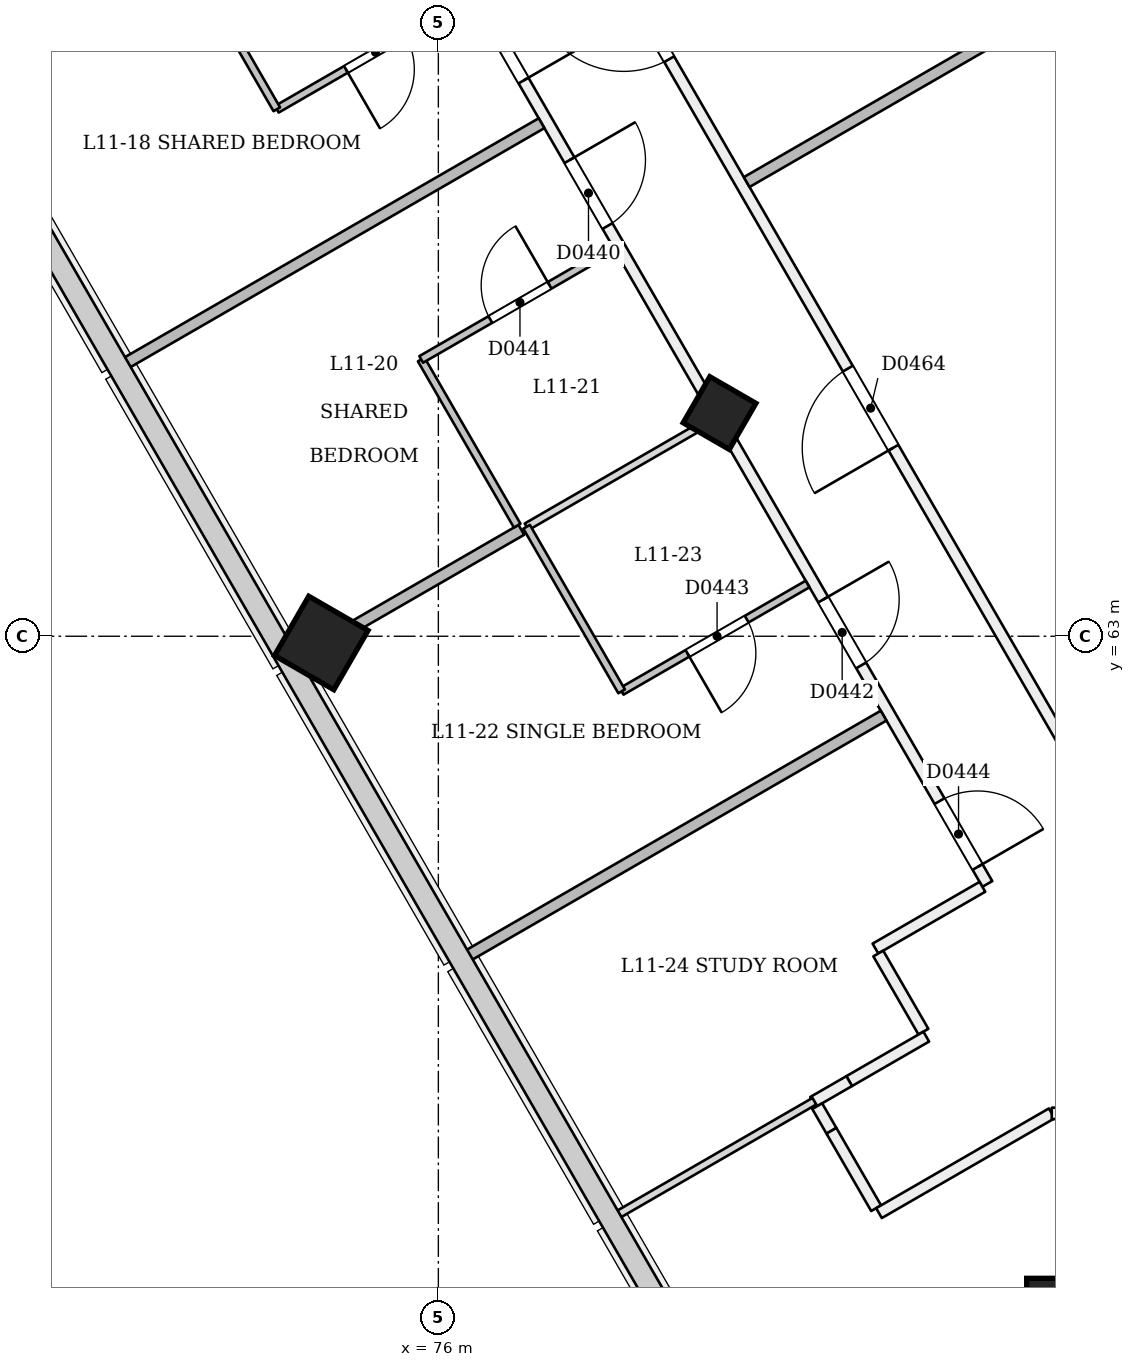
"""IFC4 building model, lengths in metres.
Left out: names, types, materials, properties, quantities, classifications, styles, units other than length and angle.
Written with IfcOpenShell. Run it as: python <this file> out.ifc"""

import sys

from ifc_helpers import new_model, si_unit, direction, frame, frame_2d, origin, origin_2d, place, context, subcontext, project, spatial, rectangle, extrude, element, fill, save


model = new_model("IFC4")
c1 = context("Model", 3, precision=1e-05, world=origin(), true_north=direction((0.0, 1.0)))
c2 = subcontext(c1, "Body", "Model", "MODEL_VIEW")
j1 = project(units=[si_unit("LENGTHUNIT", "METRE"), si_unit("PLANEANGLEUNIT", "RADIAN")], contexts=[c1])
p1 = place(None, origin())
s1 = spatial("IfcSite", under=j1, at=p1, CompositionType="ELEMENT")
p2 = place(p1, origin())
s2 = spatial("IfcBuilding", under=s1, at=p2, CompositionType="ELEMENT")
p3 = place(p2, frame((0.0, 0.0, 48.6)))
s3 = spatial("IfcBuildingStorey", under=s2, at=p3, CompositionType="ELEMENT", Elevation=48.6)
p4 = place(p3, frame((79.672, 65.889, -0.021), z_axis=(0.022222910879, 0.038415824599, 0.999014697916), x_axis=(-0.866022865462, -0.498524997193, 0.038434667567)))
e1 = element("IfcColumn", 1, at=p4, inside=s3, PredefinedType="COLUMN", context=c2, shape_type="SweptSolid", body=[
    extrude(rectangle(XDim=0.7, YDim=0.7, at=origin_2d()), origin(), (0.0, 0.0, 1.0), 3.604),
])
p5 = place(p3, frame((85.0, 53.223, 0.0), z_axis=(0.0, 0.058360852261, 0.998295552892), x_axis=(-1.0, 0.0, 0.0)))
e2 = element("IfcColumn", 2, at=p5, inside=s3, PredefinedType="COLUMN", context=c2, shape_type="SweptSolid", body=[
    extrude(rectangle(XDim=2.52, YDim=2.52, at=origin_2d()), origin(), (0.0, 0.0, 1.0), 3.606),
])
p6 = place(p3, frame((74.433, 62.864, -0.027), z_axis=(0.022155133694, 0.038483534979, 0.999013597298), x_axis=(-0.864981211028, -0.500328523642, 0.038456117832)))
e3 = element("IfcColumn", 3, at=p6, inside=s3, PredefinedType="COLUMN", context=c2, shape_type="SweptSolid", body=[
    extrude(rectangle(XDim=0.9, YDim=0.9, at=origin_2d()), origin(), (0.0, 0.0, 1.0), 3.604),
])
p7 = place(p3, frame((63.923, 93.17, 0.0), z_axis=(0.0, 0.0, 1.0), x_axis=(0.500002225217, -0.866024119051, 0.0)))
e4 = element("IfcWall", 4, at=p7, inside=s3, PredefinedType="PARTITIONING", context=c2, shape_type="SweptSolid", body=[
    extrude(rectangle(XDim=38.6, YDim=0.15, at=frame_2d((19.3, 0.0))), origin(), (0.0, 0.0, 1.0), 2.7),
])
p8 = place(p7, frame((0.605, 0.0, 0.0)))
e5 = element("IfcOpeningElement", 5, at=p8, cuts=e4, PredefinedType="OPENING", context=c2, shape_type="SweptSolid", body=[
    extrude(rectangle(XDim=1.0, YDim=2.1, at=frame_2d((0.5, 1.05))), frame((0.0, 0.085, 0.0), z_axis=(0.0, -1.0, 0.0), x_axis=(1.0, 0.0, 0.0)), (0.0, 0.0, 1.0), 0.171),
])
p9 = place(p7, frame((7.28, 0.0, 0.0)))
e6 = element("IfcOpeningElement", 6, at=p9, cuts=e4, PredefinedType="OPENING", context=c2, shape_type="SweptSolid", body=[
    extrude(rectangle(XDim=1.0, YDim=2.1, at=frame_2d((0.5, 1.05))), frame((0.0, 0.085, 0.0), z_axis=(0.0, -1.0, 0.0), x_axis=(1.0, 0.0, 0.0)), (0.0, 0.0, 1.0), 0.171),
])
p10 = place(p7, frame((9.72, 0.0, 0.0)))
e7 = element("IfcOpeningElement", 7, at=p10, cuts=e4, PredefinedType="OPENING", context=c2, shape_type="SweptSolid", body=[
    extrude(rectangle(XDim=1.0, YDim=2.1, at=frame_2d((0.5, 1.05))), frame((0.0, 0.085, 0.0), z_axis=(0.0, -1.0, 0.0), x_axis=(1.0, 0.0, 0.0)), (0.0, 0.0, 1.0), 0.171),
])
p11 = place(p7, frame((16.395, 0.0, 0.0)))
e8 = element("IfcOpeningElement", 8, at=p11, cuts=e4, PredefinedType="OPENING", context=c2, shape_type="SweptSolid", body=[
    extrude(rectangle(XDim=1.0, YDim=2.1, at=frame_2d((0.5, 1.05))), frame((0.0, 0.085, 0.0), z_axis=(0.0, -1.0, 0.0), x_axis=(1.0, 0.0, 0.0)), (0.0, 0.0, 1.0), 0.171),
])
p12 = place(p7, frame((18.72, 0.0, 0.0)))
e9 = element("IfcOpeningElement", 9, at=p12, cuts=e4, PredefinedType="OPENING", context=c2, shape_type="SweptSolid", body=[
    extrude(rectangle(XDim=1.0, YDim=2.1, at=frame_2d((0.5, 1.05))), frame((0.0, 0.085, 0.0), z_axis=(0.0, -1.0, 0.0), x_axis=(1.0, 0.0, 0.0)), (0.0, 0.0, 1.0), 0.171),
])
p13 = place(p7, frame((25.395, 0.0, 0.0)))
e10 = element("IfcOpeningElement", 10, at=p13, cuts=e4, PredefinedType="OPENING", context=c2, shape_type="SweptSolid", body=[
    extrude(rectangle(XDim=1.0, YDim=2.1, at=frame_2d((0.5, 1.05))), frame((0.0, 0.085, 0.0), z_axis=(0.0, -1.0, 0.0), x_axis=(1.0, 0.0, 0.0)), (0.0, 0.0, 1.0), 0.171),
])
p14 = place(p7, frame((27.605, 0.0, 0.0)))
e11 = element("IfcOpeningElement", 11, at=p14, cuts=e4, PredefinedType="OPENING", context=c2, shape_type="SweptSolid", body=[
    extrude(rectangle(XDim=1.0, YDim=2.1, at=frame_2d((0.5, 1.05))), frame((0.0, 0.085, 0.0), z_axis=(0.0, -1.0, 0.0), x_axis=(1.0, 0.0, 0.0)), (0.0, 0.0, 1.0), 0.171),
])
p15 = place(p7, frame((34.28, 0.0, 0.0)))
e12 = element("IfcOpeningElement", 12, at=p15, cuts=e4, PredefinedType="OPENING", context=c2, shape_type="SweptSolid", body=[
    extrude(rectangle(XDim=1.0, YDim=2.1, at=frame_2d((0.5, 1.05))), frame((0.0, 0.085, 0.0), z_axis=(0.0, -1.0, 0.0), x_axis=(1.0, 0.0, 0.0)), (0.0, 0.0, 1.0), 0.171),
])
p16 = place(p7, frame((37.342, 0.0, 0.0)))
e13 = element("IfcOpeningElement", 13, at=p16, cuts=e4, PredefinedType="OPENING", context=c2, shape_type="SweptSolid", body=[
    extrude(rectangle(XDim=1.0, YDim=2.1, at=frame_2d((0.5, 1.05))), frame((0.0, 0.085, 0.0), z_axis=(0.0, -1.0, 0.0), x_axis=(1.0, 0.0, 0.0)), (0.0, 0.0, 1.0), 0.171),
])
p17 = place(p3, frame((83.158, 59.704, 0.0), z_axis=(0.0, 0.0, 1.0), x_axis=(-0.866053003207, -0.499952193351, 0.0)))
e14 = element("IfcWall", 14, at=p17, inside=s3, PredefinedType="PARTITIONING", context=c2, shape_type="SweptSolid", body=[
    extrude(rectangle(XDim=1.625, YDim=0.15, at=frame_2d((0.812, 0.0))), origin(), (0.0, 0.0, 1.0), 3.1),
])
p18 = place(p3, frame((81.788, 58.826, 0.0), z_axis=(0.0, 0.0, 1.0), x_axis=(0.500030943131, -0.866007538022, 0.0)))
e15 = element("IfcWall", 15, at=p18, inside=s3, PredefinedType="PARTITIONING", context=c2, shape_type="SweptSolid", body=[
    extrude(rectangle(XDim=1.188, YDim=0.15, at=frame_2d((0.594, 0.0))), origin(), (0.0, 0.0, 1.0), 3.1),
])
p19 = place(p3, frame((82.419, 57.733, 0.0), z_axis=(0.0, 0.0, 1.0), x_axis=(-0.866053660865, -0.499951054106, 0.0)))
e16 = element("IfcWall", 16, at=p19, inside=s3, PredefinedType="PARTITIONING", context=c2, shape_type="SweptSolid", body=[
    extrude(rectangle(XDim=1.171, YDim=0.15, at=frame_2d((0.585, 0.0))), origin(), (0.0, 0.0, 1.0), 3.1),
])
p20 = place(p3, frame((81.405, 57.147, 0.0), z_axis=(0.0, 0.0, 1.0), x_axis=(-0.865963477364, -0.500107244371, 0.0)))
e17 = element("IfcWall", 17, at=p20, inside=s3, PredefinedType="PARTITIONING", context=c2, shape_type="SweptSolid", body=[
    extrude(rectangle(XDim=0.549, YDim=0.15, at=frame_2d((0.275, 0.0))), origin(), (0.0, 0.0, 1.0), 2.6),
])
p21 = place(p3, frame((80.984, 56.818, 0.0), z_axis=(0.0, 0.0, 1.0), x_axis=(0.500212318761, -0.865902786784, 0.0)))
e18 = element("IfcWall", 18, at=p21, inside=s3, PredefinedType="PARTITIONING", context=c2, shape_type="SweptSolid", body=[
    extrude(rectangle(XDim=0.374, YDim=0.15, at=frame_2d((0.187, 0.0))), origin(), (0.0, 0.0, 1.0), 2.6),
])
p22 = place(p3, frame((81.171, 56.494, 0.0), z_axis=(0.0, 0.0, 1.0), x_axis=(0.499890179513, -0.866088799389, 0.0)))
e19 = element("IfcWall", 19, at=p22, inside=s3, PredefinedType="PARTITIONING", context=c2, shape_type="SweptSolid", body=[
    extrude(rectangle(XDim=1.176, YDim=0.15, at=frame_2d((0.588, 0.0))), origin(), (0.0, 0.0, 1.0), 3.1),
])
p23 = place(p3, frame((81.797, 55.411, 0.0), z_axis=(0.0, 0.0, 1.0), x_axis=(0.866030680601, 0.499990860175, 0.0)))
e20 = element("IfcWall", 20, at=p23, inside=s3, PredefinedType="PARTITIONING", context=c2, shape_type="SweptSolid", body=[
    extrude(rectangle(XDim=2.625, YDim=0.15, at=frame_2d((1.312, 0.0))), origin(), (0.0, 0.0, 1.0), 2.6),
])
p24 = place(p3, frame((84.07, 56.723, 0.0), z_axis=(0.0, 0.0, 1.0), x_axis=(1.0, 0.0, 0.0)))
e21 = element("IfcWall", 21, at=p24, inside=s3, PredefinedType="PARTITIONING", context=c2, shape_type="SweptSolid", body=[
    extrude(rectangle(XDim=2.928, YDim=0.15, at=frame_2d((1.464, 0.0))), origin(), (0.0, 0.0, 1.0), 3.1),
])
p25 = place(p24, frame((0.493, 0.0, 0.0)))
e22 = element("IfcOpeningElement", 22, at=p25, cuts=e21, PredefinedType="OPENING", context=c2, shape_type="SweptSolid", body=[
    extrude(rectangle(XDim=1.2, YDim=2.1, at=frame_2d((0.6, 1.05))), frame((0.0, 0.085, 0.0), z_axis=(0.0, -1.0, 0.0), x_axis=(1.0, 0.0, 0.0)), (0.0, 0.0, 1.0), 0.171),
])
p26 = place(p3, frame((85.0, 60.262, 0.0), z_axis=(0.0, 0.0, 1.0), x_axis=(-0.499998554739, 0.866026238205, 0.0)))
e23 = element("IfcWall", 23, at=p26, inside=s3, PredefinedType="PARTITIONING", context=c2, shape_type="SweptSolid", body=[
    extrude(rectangle(XDim=35.031, YDim=0.15, at=frame_2d((17.515, 0.0))), origin(), (0.0, 0.0, 1.0), 3.1),
])
p27 = place(p26, frame((6.026, 0.0, 0.0)))
e24 = element("IfcOpeningElement", 24, at=p27, cuts=e23, PredefinedType="OPENING", context=c2, shape_type="SweptSolid", body=[
    extrude(rectangle(XDim=1.2, YDim=2.1, at=frame_2d((0.6, 1.05))), frame((0.0, 0.085, 0.0), z_axis=(0.0, -1.0, 0.0), x_axis=(1.0, 0.0, 0.0)), (0.0, 0.0, 1.0), 0.171),
])
p28 = place(p26, frame((19.295, 0.0, 0.0)))
e25 = element("IfcOpeningElement", 25, at=p28, cuts=e23, PredefinedType="OPENING", context=c2, shape_type="SweptSolid", body=[
    extrude(rectangle(XDim=1.2, YDim=2.1, at=frame_2d((0.6, 1.05))), frame((0.0, 0.085, 0.0), z_axis=(0.0, -1.0, 0.0), x_axis=(1.0, 0.0, 0.0)), (0.0, 0.0, 1.0), 0.171),
])
p29 = place(p26, frame((28.126, 0.0, 0.0)))
e26 = element("IfcOpeningElement", 26, at=p29, cuts=e23, PredefinedType="OPENING", context=c2, shape_type="SweptSolid", body=[
    extrude(rectangle(XDim=1.2, YDim=2.1, at=frame_2d((0.6, 1.05))), frame((0.0, 0.085, 0.0), z_axis=(0.0, -1.0, 0.0), x_axis=(1.0, 0.0, 0.0)), (0.0, 0.0, 1.0), 0.171),
])
p30 = place(p26, frame((11.927, 0.0, 0.0)))
e27 = element("IfcOpeningElement", 27, at=p30, cuts=e23, PredefinedType="OPENING", context=c2, shape_type="SweptSolid", body=[
    extrude(rectangle(XDim=1.2, YDim=2.1, at=frame_2d((0.6, 1.05))), frame((0.0, 0.085, 0.0), z_axis=(0.0, -1.0, 0.0), x_axis=(1.0, 0.0, 0.0)), (0.0, 0.0, 1.0), 0.171),
])
p31 = place(p26, frame((16.039, 0.0, 0.0)))
e28 = element("IfcOpeningElement", 28, at=p31, cuts=e23, PredefinedType="OPENING", context=c2, shape_type="SweptSolid", body=[
    extrude(rectangle(XDim=1.2, YDim=2.1, at=frame_2d((0.6, 1.05))), frame((0.0, 0.085, 0.0), z_axis=(0.0, -1.0, 0.0), x_axis=(1.0, 0.0, 0.0)), (0.0, 0.0, 1.0), 0.171),
])
p32 = place(p26, frame((23.133, 0.0, 0.0)))
e29 = element("IfcOpeningElement", 29, at=p32, cuts=e23, PredefinedType="OPENING", context=c2, shape_type="SweptSolid", body=[
    extrude(rectangle(XDim=1.0, YDim=2.1, at=frame_2d((0.5, 1.05))), frame((0.0, 0.085, 0.0), z_axis=(0.0, -1.0, 0.0), x_axis=(1.0, 0.0, 0.0)), (0.0, 0.0, 1.0), 0.171),
])
p33 = place(p3, frame((69.63, 70.484, 0.0), z_axis=(0.0, 0.0, 1.0), x_axis=(0.866020560687, 0.500008388397, 0.0)))
e30 = element("IfcWall", 30, at=p33, inside=s3, PredefinedType="PARTITIONING", context=c2, shape_type="SweptSolid", body=[
    extrude(rectangle(XDim=3.4, YDim=0.15, at=frame_2d((1.7, 0.0))), origin(), (0.0, 0.0, 1.0), 2.6),
])
p34 = place(p3, frame((76.408, 71.395, 0.0), z_axis=(0.0, 0.0, 1.0), x_axis=(-0.866046596414, -0.499963291492, 0.0)))
e31 = element("IfcWall", 31, at=p34, inside=s3, PredefinedType="PARTITIONING", context=c2, shape_type="SweptSolid", body=[
    extrude(rectangle(XDim=2.925, YDim=0.1, at=frame_2d((1.462, 0.0))), origin(), (0.0, 0.0, 1.0), 3.1),
])
p35 = place(p34, frame((0.975, 0.0, 0.0)))
e32 = element("IfcOpeningElement", 32, at=p35, cuts=e31, PredefinedType="OPENING", context=c2, shape_type="SweptSolid", body=[
    extrude(rectangle(XDim=0.9, YDim=2.1, at=frame_2d((0.45, 1.05))), frame((0.0, 0.061, 0.0), z_axis=(0.0, -1.0, 0.0), x_axis=(1.0, 0.0, 0.0)), (0.0, 0.0, 1.0), 0.121),
])
p36 = place(p3, frame((73.875, 69.933, 0.0), z_axis=(0.0, 0.0, 1.0), x_axis=(-0.500047596559, 0.865997922154, 0.0)))
e33 = element("IfcWall", 33, at=p36, inside=s3, PredefinedType="PARTITIONING", context=c2, shape_type="SweptSolid", body=[
    extrude(rectangle(XDim=2.6, YDim=0.1, at=frame_2d((1.3, 0.0))), origin(), (0.0, 0.0, 1.0), 2.7),
])
p37 = place(p3, frame((71.863, 66.577, 0.0), z_axis=(0.0, 0.0, 1.0), x_axis=(0.866025401434, 0.500000004071, 0.0)))
e34 = element("IfcWall", 34, at=p37, inside=s3, PredefinedType="PARTITIONING", context=c2, shape_type="SweptSolid", body=[
    extrude(rectangle(XDim=6.345, YDim=0.15, at=frame_2d((3.173, 0.0))), origin(), (0.0, 0.0, 1.0), 2.6),
])
p38 = place(p3, frame((77.037, 64.455, 0.0), z_axis=(0.0, 0.0, 1.0), x_axis=(-0.500048846702, 0.865997200291, 0.0)))
e35 = element("IfcWall", 35, at=p38, inside=s3, PredefinedType="PARTITIONING", context=c2, shape_type="SweptSolid", body=[
    extrude(rectangle(XDim=2.525, YDim=0.1, at=frame_2d((1.263, 0.0))), origin(), (0.0, 0.0, 1.0), 2.7),
])
p39 = place(p3, frame((75.774, 66.642, 0.0), z_axis=(0.0, 0.0, 1.0), x_axis=(0.866046596414, 0.499963291492, 0.0)))
e36 = element("IfcWall", 36, at=p39, inside=s3, PredefinedType="PARTITIONING", context=c2, shape_type="SweptSolid", body=[
    extrude(rectangle(XDim=2.925, YDim=0.1, at=frame_2d((1.462, 0.0))), origin(), (0.0, 0.0, 1.0), 3.1),
])
p40 = place(p39, frame((1.05, 0.0, 0.0)))
e37 = element("IfcOpeningElement", 37, at=p40, cuts=e36, PredefinedType="OPENING", context=c2, shape_type="SweptSolid", body=[
    extrude(rectangle(XDim=0.9, YDim=2.1, at=frame_2d((0.45, 1.05))), frame((0.0, 0.061, 0.0), z_axis=(0.0, -1.0, 0.0), x_axis=(1.0, 0.0, 0.0)), (0.0, 0.0, 1.0), 0.121),
])
p41 = place(p3, frame((74.13, 62.69, 0.0), z_axis=(0.0, 0.0, 1.0), x_axis=(0.866020337685, 0.500008774639, 0.0)))
e38 = element("IfcWall", 38, at=p41, inside=s3, PredefinedType="PARTITIONING", context=c2, shape_type="SweptSolid", body=[
    extrude(rectangle(XDim=3.42, YDim=0.15, at=frame_2d((1.71, 0.0))), origin(), (0.0, 0.0, 1.0), 2.6),
])
p42 = place(p3, frame((77.161, 64.44, 0.0), z_axis=(0.0, 0.0, 1.0), x_axis=(0.866011447264, 0.500024172624, 0.0)))
e39 = element("IfcWall", 39, at=p42, inside=s3, PredefinedType="PARTITIONING", context=c2, shape_type="SweptSolid", body=[
    extrude(rectangle(XDim=2.825, YDim=0.1, at=frame_2d((1.413, 0.0))), origin(), (0.0, 0.0, 1.0), 2.7),
])
p43 = place(p3, frame((80.858, 63.687, 0.0), z_axis=(0.0, 0.0, 1.0), x_axis=(-0.866048868473, -0.499959355765, 0.0)))
e40 = element("IfcWall", 40, at=p43, inside=s3, PredefinedType="PARTITIONING", context=c2, shape_type="SweptSolid", body=[
    extrude(rectangle(XDim=2.825, YDim=0.1, at=frame_2d((1.413, 0.0))), origin(), (0.0, 0.0, 1.0), 3.1),
])
p44 = place(p43, frame((0.925, 0.0, 0.0)))
e41 = element("IfcOpeningElement", 41, at=p44, cuts=e40, PredefinedType="OPENING", context=c2, shape_type="SweptSolid", body=[
    extrude(rectangle(XDim=0.9, YDim=2.1, at=frame_2d((0.45, 1.05))), frame((0.0, 0.061, 0.0), z_axis=(0.0, -1.0, 0.0), x_axis=(1.0, 0.0, 0.0)), (0.0, 0.0, 1.0), 0.121),
])
p45 = place(p3, frame((78.411, 62.275, 0.0), z_axis=(0.0, 0.0, 1.0), x_axis=(-0.500004234368, 0.866022959057, 0.0)))
e42 = element("IfcWall", 42, at=p45, inside=s3, PredefinedType="PARTITIONING", context=c2, shape_type="SweptSolid", body=[
    extrude(rectangle(XDim=2.5, YDim=0.1, at=frame_2d((1.25, 0.0))), origin(), (0.0, 0.0, 1.0), 2.7),
])
p46 = place(p3, frame((76.363, 58.783, 0.0), z_axis=(0.0, 0.0, 1.0), x_axis=(0.866025401434, 0.500000004071, 0.0)))
e43 = element("IfcWall", 43, at=p46, inside=s3, PredefinedType="PARTITIONING", context=c2, shape_type="SweptSolid", body=[
    extrude(rectangle(XDim=6.345, YDim=0.15, at=frame_2d((3.173, 0.0))), origin(), (0.0, 0.0, 1.0), 2.6),
])
p47 = place(p3, frame((78.331, 55.373, 0.0), z_axis=(0.0, 0.0, 1.0), x_axis=(0.866030774596, 0.499990697366, 0.0)))
e44 = element("IfcWall", 44, at=p47, inside=s3, PredefinedType="PARTITIONING", context=c2, shape_type="SweptSolid", body=[
    extrude(rectangle(XDim=3.02, YDim=0.1, at=frame_2d((1.51, 0.0))), origin(), (0.0, 0.0, 1.0), 2.6),
])
p48 = place(p3, frame((93.027, 76.464, 0.0), z_axis=(0.0, 0.0, 1.0), x_axis=(-0.866028686662, -0.499994313846, 0.0)))
e45 = element("IfcWall", 45, at=p48, inside=s3, PredefinedType="PARTITIONING", context=c2, shape_type="SweptSolid", body=[
    extrude(rectangle(XDim=14.977, YDim=0.15, at=frame_2d((7.489, 0.0))), origin(), (0.0, 0.0, 1.0), 3.1),
])
p49 = place(p13, origin())
e46 = element("IfcDoor", 46, at=p49, inside=s3, OperationType="SINGLE_SWING_RIGHT", PredefinedType="NOTDEFINED", context=c2, shape_type="SweptSolid", body=[
    extrude(rectangle(XDim=1.0, YDim=2.1, at=frame_2d((0.5, 1.05))), frame((0.0, 0.025, 0.0), z_axis=(0.0, -1.0, 0.0), x_axis=(1.0, 0.0, 0.0)), (0.0, 0.0, 1.0), 0.05),
])
fill(e10, e46)
p50 = place(p35, origin())
e47 = element("IfcDoor", 47, at=p50, inside=s3, OperationType="SINGLE_SWING_RIGHT", PredefinedType="NOTDEFINED", context=c2, shape_type="SweptSolid", body=[
    extrude(rectangle(XDim=0.9, YDim=2.1, at=frame_2d((0.45, 1.05))), frame((0.0, 0.025, 0.0), z_axis=(0.0, -1.0, 0.0), x_axis=(1.0, 0.0, 0.0)), (0.0, 0.0, 1.0), 0.05),
])
fill(e32, e47)
p51 = place(p14, origin())
e48 = element("IfcDoor", 48, at=p51, inside=s3, OperationType="SINGLE_SWING_LEFT", PredefinedType="NOTDEFINED", context=c2, shape_type="SweptSolid", body=[
    extrude(rectangle(XDim=1.0, YDim=2.1, at=frame_2d((0.5, 1.05))), frame((0.0, 0.025, 0.0), z_axis=(0.0, -1.0, 0.0), x_axis=(1.0, 0.0, 0.0)), (0.0, 0.0, 1.0), 0.05),
])
fill(e11, e48)
p52 = place(p40, origin())
e49 = element("IfcDoor", 49, at=p52, inside=s3, OperationType="SINGLE_SWING_RIGHT", PredefinedType="NOTDEFINED", context=c2, shape_type="SweptSolid", body=[
    extrude(rectangle(XDim=0.9, YDim=2.1, at=frame_2d((0.45, 1.05))), frame((0.0, 0.025, 0.0), z_axis=(0.0, -1.0, 0.0), x_axis=(1.0, 0.0, 0.0)), (0.0, 0.0, 1.0), 0.05),
])
fill(e37, e49)
p53 = place(p15, origin())
e50 = element("IfcDoor", 50, at=p53, inside=s3, OperationType="SINGLE_SWING_LEFT", PredefinedType="NOTDEFINED", context=c2, shape_type="SweptSolid", body=[
    extrude(rectangle(XDim=1.0, YDim=2.1, at=frame_2d((0.5, 1.05))), frame((0.0, 0.025, 0.0), z_axis=(0.0, -1.0, 0.0), x_axis=(1.0, 0.0, 0.0)), (0.0, 0.0, 1.0), 0.05),
])
fill(e12, e50)
p54 = place(p44, origin())
e51 = element("IfcDoor", 51, at=p54, inside=s3, OperationType="SINGLE_SWING_RIGHT", PredefinedType="NOTDEFINED", context=c2, shape_type="SweptSolid", body=[
    extrude(rectangle(XDim=0.9, YDim=2.1, at=frame_2d((0.45, 1.05))), frame((0.0, 0.025, 0.0), z_axis=(0.0, -1.0, 0.0), x_axis=(1.0, 0.0, 0.0)), (0.0, 0.0, 1.0), 0.05),
])
fill(e41, e51)
p55 = place(p16, origin())
e52 = element("IfcDoor", 52, at=p55, inside=s3, OperationType="SINGLE_SWING_RIGHT", PredefinedType="NOTDEFINED", context=c2, shape_type="SweptSolid", body=[
    extrude(rectangle(XDim=1.0, YDim=2.1, at=frame_2d((0.5, 1.05))), frame((0.0, 0.025, 0.0), z_axis=(0.0, -1.0, 0.0), x_axis=(1.0, 0.0, 0.0)), (0.0, 0.0, 1.0), 0.05),
])
fill(e13, e52)
p56 = place(p27, origin())
e53 = element("IfcDoor", 53, at=p56, inside=s3, OperationType="SINGLE_SWING_LEFT", PredefinedType="NOTDEFINED", context=c2, shape_type="SweptSolid", body=[
    extrude(rectangle(XDim=1.2, YDim=2.1, at=frame_2d((0.6, 1.05))), frame((0.0, 0.025, 0.0), z_axis=(0.0, -1.0, 0.0), x_axis=(1.0, 0.0, 0.0)), (0.0, 0.0, 1.0), 0.05),
])
fill(e24, e53)
p57 = place(p30, origin())
e54 = element("IfcDoor", 54, at=p57, inside=s3, OperationType="SINGLE_SWING_RIGHT", PredefinedType="NOTDEFINED", context=c2, shape_type="SweptSolid", body=[
    extrude(rectangle(XDim=1.2, YDim=2.1, at=frame_2d((0.6, 1.05))), frame((0.0, 0.025, 0.0), z_axis=(0.0, -1.0, 0.0), x_axis=(1.0, 0.0, 0.0)), (0.0, 0.0, 1.0), 0.05),
])
fill(e27, e54)
save(model, sys.argv[1])
